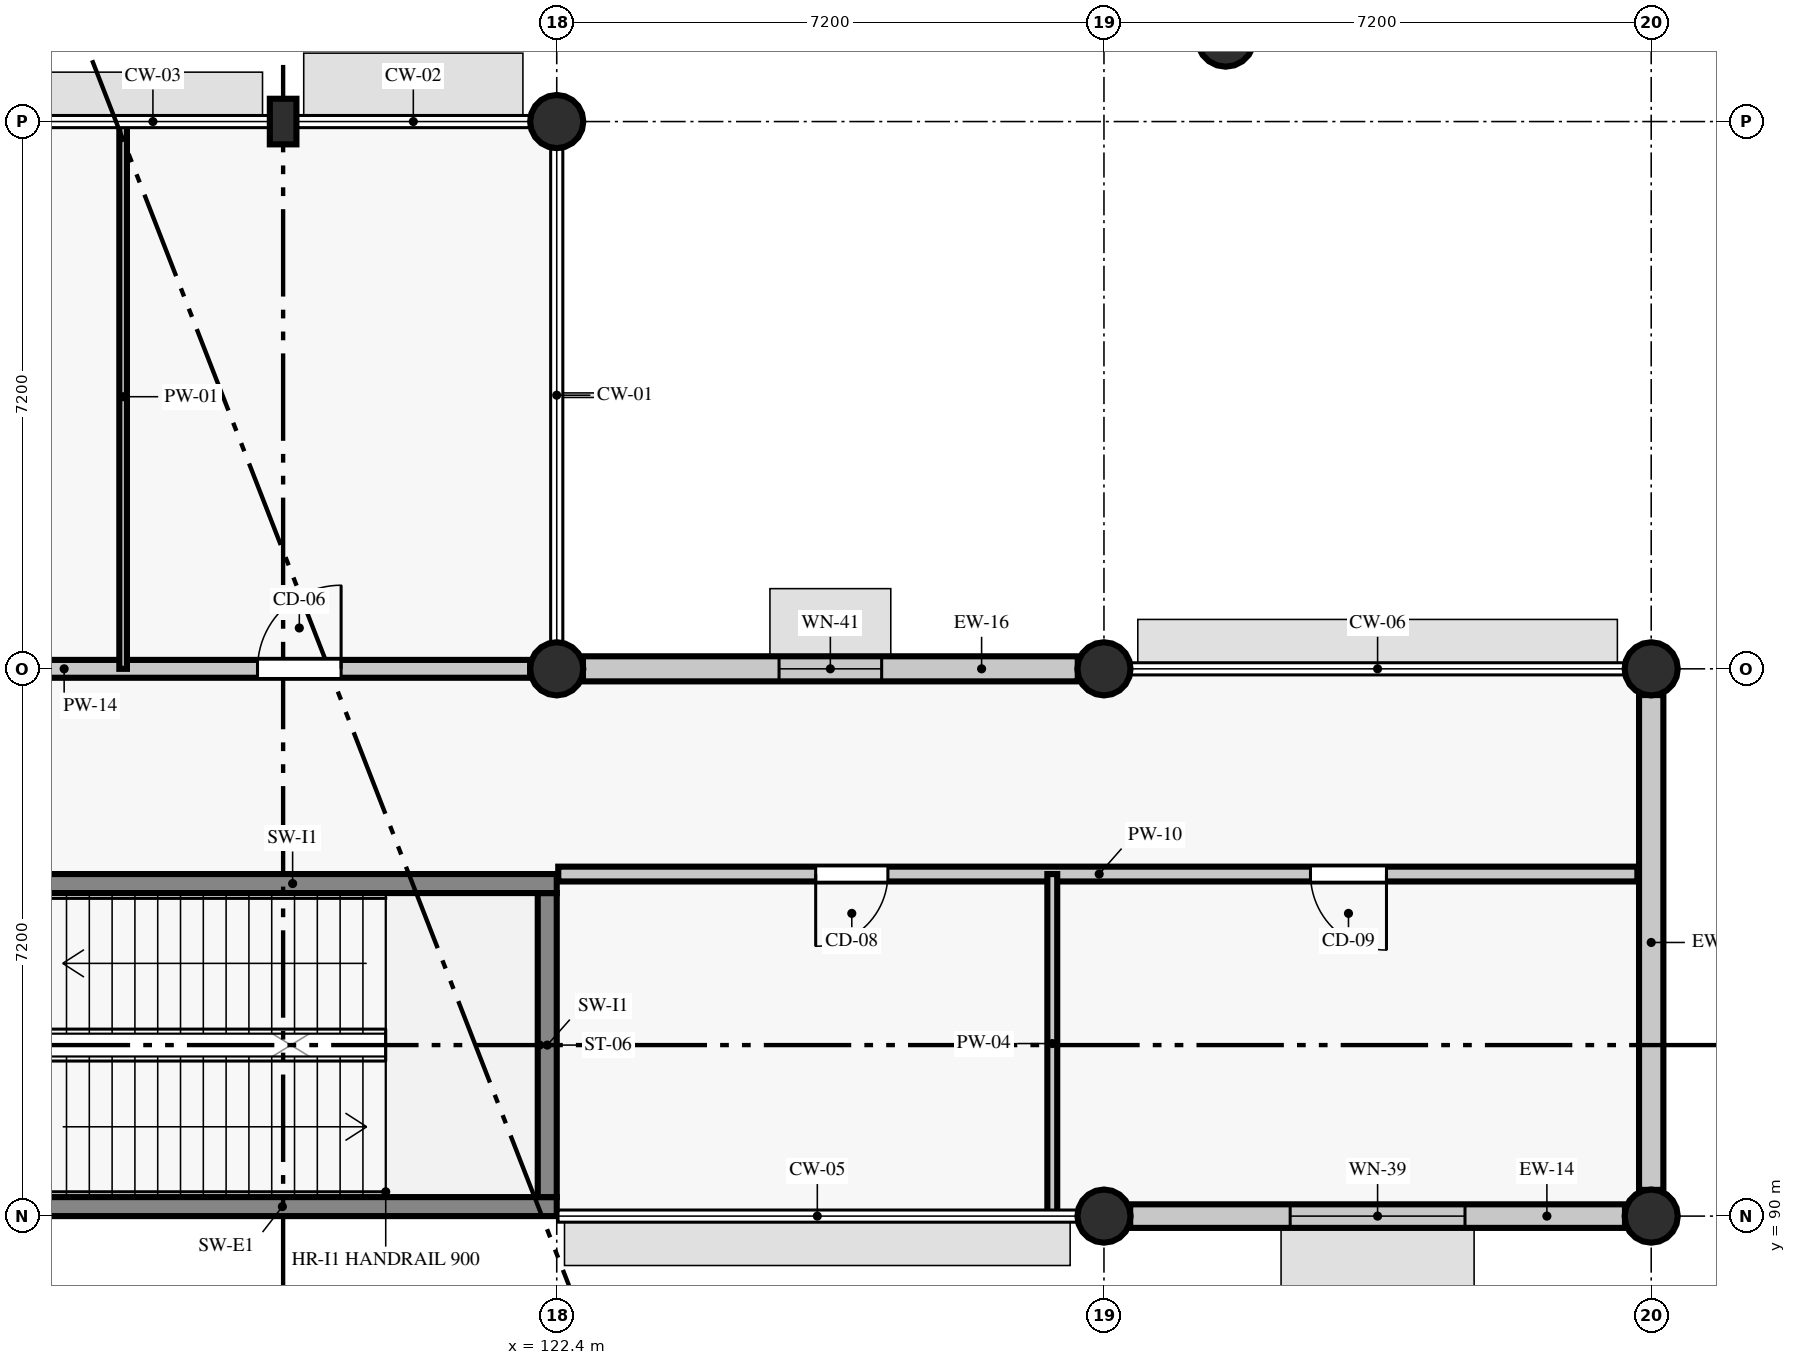
"""IFC4 building model, lengths in metres.
Left out: names, types, materials, properties, quantities, classifications, styles, units other than length and angle.
Written with IfcOpenShell. Run it as: python <this file> out.ifc"""

import sys

from ifc_helpers import new_model, si_unit, direction, frame, frame_2d, origin, origin_2d, place, context, subcontext, project, spatial, rectangle, circle, extrude, element, fill, save


model = new_model("IFC4")
c1 = context("Model", 3, precision=1e-05, world=origin(), true_north=direction((0.0, 1.0)))
c2 = subcontext(c1, "Body", "Model", "MODEL_VIEW")
j1 = project(units=[si_unit("LENGTHUNIT", "METRE"), si_unit("PLANEANGLEUNIT", "RADIAN")], contexts=[c1])
p1 = place(None, origin())
s1 = spatial("IfcSite", under=j1, at=p1, CompositionType="ELEMENT")
p2 = place(p1, origin())
s2 = spatial("IfcBuilding", under=s1, at=p2, CompositionType="ELEMENT")
p3 = place(p2, frame((0.0, 0.0, 4.8)))
s3 = spatial("IfcBuildingStorey", under=s2, at=p3, CompositionType="ELEMENT", Elevation=4.8)
for number, where, z_axis, x_axis in (
    (1, (122.4, 97.2, 0.0), (0.0, 0.0, 1.0), (1.0, 0.0, 0.0)),
    (2, (122.4, 104.4, 0.0), (0.0, 0.0, 1.0), (1.0, 0.0, 0.0)),
    (3, (129.6, 90.0, 0.0), (0.0, 0.0, 1.0), (1.0, 0.0, 0.0)),
    (4, (129.6, 97.2, 0.0), (0.0, 0.0, 1.0), (1.0, 0.0, 0.0)),
):
    element("IfcColumn", number, at=place(p3, frame(where, z_axis=z_axis, x_axis=x_axis)), inside=s3, PredefinedType="COLUMN", context=c2, shape_type="SweptSolid", body=[
        extrude(circle(Radius=0.35, at=origin_2d()), origin(), (0.0, 0.0, 1.0), 4.53),
    ])
for number, where, z_axis, x_axis in (
    (5, (136.8, 90.0, 0.0), (0.0, 0.0, 1.0), (1.0, 0.0, 0.0)),
    (6, (136.8, 97.2, 0.0), (0.0, 0.0, 1.0), (1.0, 0.0, 0.0)),
):
    element("IfcColumn", number, at=place(p3, frame(where, z_axis=z_axis, x_axis=x_axis)), inside=s3, PredefinedType="COLUMN", context=c2, shape_type="SweptSolid", body=[
        extrude(circle(Radius=0.35, at=origin_2d()), origin(), (0.0, 0.0, 1.0), 4.562),
    ])
p4 = place(p3, frame((118.8, 104.4, 0.0), z_axis=(0.0, 0.0, 1.0), x_axis=(1.0, 0.0, 0.0)))
e7 = element("IfcColumn", 7, at=p4, inside=s3, PredefinedType="PILASTER", context=c2, shape_type="SweptSolid", body=[
    extrude(rectangle(XDim=0.35, YDim=0.6, at=origin_2d()), origin(), (0.0, 0.0, 1.0), 4.53),
])
p5 = place(p3, frame((131.201, 105.497, 0.0), z_axis=(0.0, 0.0, 1.0), x_axis=(1.0, 0.0, 0.0)))
e8 = element("IfcColumn", 8, at=p5, inside=s3, PredefinedType="COLUMN", context=c2, shape_type="SweptSolid", body=[
    extrude(circle(Radius=0.375, at=origin_2d()), origin(), (0.0, 0.0, 1.0), 4.8),
])
p6 = place(p3, frame((129.945, 90.0, 0.0), z_axis=(0.0, 0.0, 1.0), x_axis=(1.0, 0.0, 0.0)))
e9 = element("IfcWall", 9, at=p6, inside=s3, PredefinedType="STANDARD", context=c2, shape_type="SweptSolid", body=[
    extrude(rectangle(XDim=6.51, YDim=0.31, at=frame_2d((3.255, 0.0))), origin(), (0.0, 0.0, 1.0), 3.912),
])
p7 = place(p6, frame((2.105, 0.0, 0.9)))
e10 = element("IfcOpeningElement", 10, at=p7, cuts=e9, PredefinedType="OPENING", context=c2, shape_type="SweptSolid", body=[
    extrude(rectangle(XDim=2.3, YDim=1.66, at=frame_2d((1.15, 0.83))), frame((0.0, 0.165, 0.0), z_axis=(0.0, -1.0, 0.0), x_axis=(1.0, 0.0, 0.0)), (0.0, 0.0, 1.0), 0.33),
])
p8 = place(p3, frame((136.8, 90.345, 0.0), z_axis=(0.0, 0.0, 1.0), x_axis=(0.0, 1.0, 0.0)))
e11 = element("IfcWall", 11, at=p8, inside=s3, PredefinedType="STANDARD", context=c2, shape_type="SweptSolid", body=[
    extrude(rectangle(XDim=6.51, YDim=0.32, at=frame_2d((3.255, 0.0))), origin(), (0.0, 0.0, 1.0), 3.912),
])
p9 = place(p3, frame((129.255, 97.2, 0.0), z_axis=(0.0, 0.0, 1.0), x_axis=(-1.0, 0.0, 0.0)))
e12 = element("IfcWall", 12, at=p9, inside=s3, PredefinedType="STANDARD", context=c2, shape_type="SweptSolid", body=[
    extrude(rectangle(XDim=6.51, YDim=0.33, at=frame_2d((3.255, 0.0))), origin(), (0.0, 0.0, 1.0), 3.88),
])
p10 = place(p9, frame((2.58, 0.0, 0.9)))
e13 = element("IfcOpeningElement", 13, at=p10, cuts=e12, PredefinedType="OPENING", context=c2, shape_type="SweptSolid", body=[
    extrude(rectangle(XDim=1.35, YDim=1.78, at=frame_2d((0.675, 0.89))), frame((0.0, 0.175, 0.0), z_axis=(0.0, -1.0, 0.0), x_axis=(1.0, 0.0, 0.0)), (0.0, 0.0, 1.0), 0.35),
])
p11 = place(p3, frame((113.6, 90.125, 0.0), z_axis=(0.0, 0.0, 1.0), x_axis=(1.0, 0.0, 0.0)))
e14 = element("IfcWall", 14, at=p11, inside=s3, PredefinedType="SHEAR", context=c2, shape_type="SweptSolid", body=[
    extrude(rectangle(XDim=8.8, YDim=0.25, at=frame_2d((4.4, 0.0))), origin(), (0.0, 0.0, 1.0), 4.53),
])
p12 = place(p11, frame((0.35, 0.0, 0.92)))
e15 = element("IfcOpeningElement", 15, at=p12, cuts=e14, PredefinedType="OPENING", context=c2, shape_type="SweptSolid", body=[
    extrude(rectangle(XDim=1.18, YDim=1.48, at=frame_2d((0.59, 0.74))), frame((0.0, 0.135, 0.0), z_axis=(0.0, -1.0, 0.0), x_axis=(1.0, 0.0, 0.0)), (0.0, 0.0, 1.0), 0.27),
])
p13 = place(p3, frame((122.275, 90.25, 0.0), z_axis=(0.0, 0.0, 1.0), x_axis=(0.0, 1.0, 0.0)))
e16 = element("IfcWall", 16, at=p13, inside=s3, PredefinedType="SHEAR", context=c2, shape_type="SweptSolid", body=[
    extrude(rectangle(XDim=4.0, YDim=0.25, at=frame_2d((2.0, 0.0))), origin(), (0.0, 0.0, 1.0), 4.53),
])
p14 = place(p3, frame((122.4, 94.375, 0.0), z_axis=(0.0, 0.0, 1.0), x_axis=(-1.0, 0.0, 0.0)))
e17 = element("IfcWall", 17, at=p14, inside=s3, PredefinedType="SHEAR", context=c2, shape_type="SweptSolid", body=[
    extrude(rectangle(XDim=8.8, YDim=0.25, at=frame_2d((4.4, 0.0))), origin(), (0.0, 0.0, 1.0), 4.53),
])
p15 = place(p14, frame((7.0, 0.0, 0.0)))
e18 = element("IfcOpeningElement", 18, at=p15, cuts=e17, PredefinedType="OPENING", context=c2, shape_type="SweptSolid", body=[
    extrude(rectangle(XDim=1.5, YDim=2.15, at=frame_2d((0.75, 1.075))), frame((0.0, 0.135, 0.0), z_axis=(0.0, -1.0, 0.0), x_axis=(1.0, 0.0, 0.0)), (0.0, 0.0, 1.0), 0.27),
])
p16 = place(p3, frame((93.95, 97.2, 0.0), z_axis=(0.0, 0.0, 1.0), x_axis=(1.0, 0.0, 0.0)))
e19 = element("IfcWall", 19, at=p16, inside=s3, PredefinedType="PARTITIONING", context=c2, shape_type="SweptSolid", body=[
    extrude(rectangle(XDim=28.1, YDim=0.235, at=frame_2d((14.05, 0.0))), origin(), (0.0, 0.0, 1.0), 3.78),
])
p17 = place(p16, frame((2.3, 0.0, 0.0)))
e20 = element("IfcOpeningElement", 20, at=p17, cuts=e19, PredefinedType="OPENING", context=c2, shape_type="SweptSolid", body=[
    extrude(rectangle(XDim=1.12, YDim=2.23, at=frame_2d((0.56, 1.115))), frame((0.0, 0.127, 0.0), z_axis=(0.0, -1.0, 0.0), x_axis=(1.0, 0.0, 0.0)), (0.0, 0.0, 1.0), 0.255),
])
p18 = place(p16, frame((4.19, 0.0, 0.0)))
e21 = element("IfcOpeningElement", 21, at=p18, cuts=e19, PredefinedType="OPENING", context=c2, shape_type="SweptSolid", body=[
    extrude(rectangle(XDim=1.2, YDim=2.23, at=frame_2d((0.6, 1.115))), frame((0.0, 0.127, 0.0), z_axis=(0.0, -1.0, 0.0), x_axis=(1.0, 0.0, 0.0)), (0.0, 0.0, 1.0), 0.255),
])
p19 = place(p16, frame((7.84, 0.0, 0.0)))
e22 = element("IfcOpeningElement", 22, at=p19, cuts=e19, PredefinedType="OPENING", context=c2, shape_type="SweptSolid", body=[
    extrude(rectangle(XDim=0.9, YDim=2.08, at=frame_2d((0.45, 1.04))), frame((0.0, 0.127, 0.0), z_axis=(0.0, -1.0, 0.0), x_axis=(1.0, 0.0, 0.0)), (0.0, 0.0, 1.0), 0.255),
])
p20 = place(p16, frame((10.01, 0.0, 0.0)))
e23 = element("IfcOpeningElement", 23, at=p20, cuts=e19, PredefinedType="OPENING", context=c2, shape_type="SweptSolid", body=[
    extrude(rectangle(XDim=0.9, YDim=2.13, at=frame_2d((0.45, 1.065))), frame((0.0, 0.127, 0.0), z_axis=(0.0, -1.0, 0.0), x_axis=(1.0, 0.0, 0.0)), (0.0, 0.0, 1.0), 0.255),
])
p21 = place(p16, frame((12.23, 0.0, 0.0)))
e24 = element("IfcOpeningElement", 24, at=p21, cuts=e19, PredefinedType="OPENING", context=c2, shape_type="SweptSolid", body=[
    extrude(rectangle(XDim=0.92, YDim=2.18, at=frame_2d((0.46, 1.09))), frame((0.0, 0.127, 0.0), z_axis=(0.0, -1.0, 0.0), x_axis=(1.0, 0.0, 0.0)), (0.0, 0.0, 1.0), 0.255),
])
p22 = place(p16, frame((16.705, 0.0, 0.0)))
e25 = element("IfcOpeningElement", 25, at=p22, cuts=e19, PredefinedType="OPENING", context=c2, shape_type="SweptSolid", body=[
    extrude(rectangle(XDim=1.02, YDim=2.08, at=frame_2d((0.51, 1.04))), frame((0.0, 0.127, 0.0), z_axis=(0.0, -1.0, 0.0), x_axis=(1.0, 0.0, 0.0)), (0.0, 0.0, 1.0), 0.255),
])
p23 = place(p16, frame((18.365, 0.0, 0.0)))
e26 = element("IfcOpeningElement", 26, at=p23, cuts=e19, PredefinedType="OPENING", context=c2, shape_type="SweptSolid", body=[
    extrude(rectangle(XDim=1.06, YDim=2.08, at=frame_2d((0.53, 1.04))), frame((0.0, 0.127, 0.0), z_axis=(0.0, -1.0, 0.0), x_axis=(1.0, 0.0, 0.0)), (0.0, 0.0, 1.0), 0.255),
])
p24 = place(p16, frame((24.513, 0.0, 0.0)))
e27 = element("IfcOpeningElement", 27, at=p24, cuts=e19, PredefinedType="OPENING", context=c2, shape_type="SweptSolid", body=[
    extrude(rectangle(XDim=1.1, YDim=2.08, at=frame_2d((0.55, 1.04))), frame((0.0, 0.127, 0.0), z_axis=(0.0, -1.0, 0.0), x_axis=(1.0, 0.0, 0.0)), (0.0, 0.0, 1.0), 0.255),
])
p25 = place(p3, frame((116.695, 97.2, 0.0), z_axis=(0.0, 0.0, 1.0), x_axis=(0.0, 1.0, 0.0)))
e28 = element("IfcWall", 28, at=p25, inside=s3, PredefinedType="PARTITIONING", context=c2, shape_type="SweptSolid", body=[
    extrude(rectangle(XDim=7.16, YDim=0.1, at=frame_2d((3.58, 0.0))), origin(), (0.0, 0.0, 1.0), 3.78),
])
p26 = place(p3, frame((122.42, 94.5, 0.0), z_axis=(0.0, 0.0, 1.0), x_axis=(1.0, 0.0, 0.0)))
e29 = element("IfcWall", 29, at=p26, inside=s3, PredefinedType="PARTITIONING", context=c2, shape_type="SweptSolid", body=[
    extrude(rectangle(XDim=14.198, YDim=0.195, at=frame_2d((7.099, 0.0))), origin(), (0.0, 0.0, 1.0), 4.012),
])
p27 = place(p26, frame((3.387, 0.0, 0.0)))
e30 = element("IfcOpeningElement", 30, at=p27, cuts=e29, PredefinedType="OPENING", context=c2, shape_type="SweptSolid", body=[
    extrude(rectangle(XDim=0.95, YDim=2.13, at=frame_2d((0.475, 1.065))), frame((0.0, 0.107, 0.0), z_axis=(0.0, -1.0, 0.0), x_axis=(1.0, 0.0, 0.0)), (0.0, 0.0, 1.0), 0.215),
])
p28 = place(p26, frame((9.897, 0.0, 0.0)))
e31 = element("IfcOpeningElement", 31, at=p28, cuts=e29, PredefinedType="OPENING", context=c2, shape_type="SweptSolid", body=[
    extrude(rectangle(XDim=1.0, YDim=2.13, at=frame_2d((0.5, 1.065))), frame((0.0, 0.107, 0.0), z_axis=(0.0, -1.0, 0.0), x_axis=(1.0, 0.0, 0.0)), (0.0, 0.0, 1.0), 0.215),
])
p29 = place(p3, frame((128.92, 90.04, 0.0), z_axis=(0.0, 0.0, 1.0), x_axis=(0.0, 1.0, 0.0)))
e32 = element("IfcWall", 32, at=p29, inside=s3, PredefinedType="PARTITIONING", context=c2, shape_type="SweptSolid", body=[
    extrude(rectangle(XDim=4.46, YDim=0.13, at=frame_2d((2.23, 0.0))), origin(), (0.0, 0.0, 1.0), 4.53),
])
p30 = place(p7, origin())
e33 = element("IfcWindow", 33, at=p30, inside=s3, PartitioningType="SINGLE_PANEL", PredefinedType="WINDOW", context=c2, shape_type="SweptSolid", body=[
    extrude(rectangle(XDim=2.3, YDim=1.66, at=frame_2d((1.15, 0.83))), frame((0.0, 0.03, 0.0), z_axis=(0.0, -1.0, 0.0), x_axis=(1.0, 0.0, 0.0)), (0.0, 0.0, 1.0), 0.06),
])
fill(e10, e33)
p31 = place(p10, origin())
e34 = element("IfcWindow", 34, at=p31, inside=s3, PartitioningType="SINGLE_PANEL", PredefinedType="WINDOW", context=c2, shape_type="SweptSolid", body=[
    extrude(rectangle(XDim=1.35, YDim=1.78, at=frame_2d((0.675, 0.89))), frame((0.0, 0.03, 0.0), z_axis=(0.0, -1.0, 0.0), x_axis=(1.0, 0.0, 0.0)), (0.0, 0.0, 1.0), 0.06),
])
fill(e13, e34)
p32 = place(p24, origin())
e35 = element("IfcDoor", 35, at=p32, inside=s3, OperationType="SINGLE_SWING_RIGHT", PredefinedType="DOOR", context=c2, shape_type="SweptSolid", body=[
    extrude(rectangle(XDim=1.1, YDim=2.08, at=frame_2d((0.55, 1.04))), frame((0.0, 0.025, 0.0), z_axis=(0.0, -1.0, 0.0), x_axis=(1.0, 0.0, 0.0)), (0.0, 0.0, 1.0), 0.05),
])
fill(e27, e35)
p33 = place(p27, frame((0.95, 0.0, 0.0), z_axis=(0.0, 0.0, 1.0), x_axis=(-1.0, 0.0, 0.0)))
e36 = element("IfcDoor", 36, at=p33, inside=s3, OperationType="SINGLE_SWING_RIGHT", PredefinedType="DOOR", context=c2, shape_type="SweptSolid", body=[
    extrude(rectangle(XDim=0.95, YDim=2.13, at=frame_2d((0.475, 1.065))), frame((0.0, 0.025, 0.0), z_axis=(0.0, -1.0, 0.0), x_axis=(1.0, 0.0, 0.0)), (0.0, 0.0, 1.0), 0.05),
])
fill(e30, e36)
p34 = place(p28, frame((1.0, 0.0, 0.0), z_axis=(0.0, 0.0, 1.0), x_axis=(-1.0, 0.0, 0.0)))
e37 = element("IfcDoor", 37, at=p34, inside=s3, OperationType="SINGLE_SWING_LEFT", PredefinedType="DOOR", context=c2, shape_type="SweptSolid", body=[
    extrude(rectangle(XDim=1.0, YDim=2.13, at=frame_2d((0.5, 1.065))), frame((0.0, 0.025, 0.0), z_axis=(0.0, -1.0, 0.0), x_axis=(1.0, 0.0, 0.0)), (0.0, 0.0, 1.0), 0.05),
])
fill(e31, e37)
save(model, sys.argv[1])
